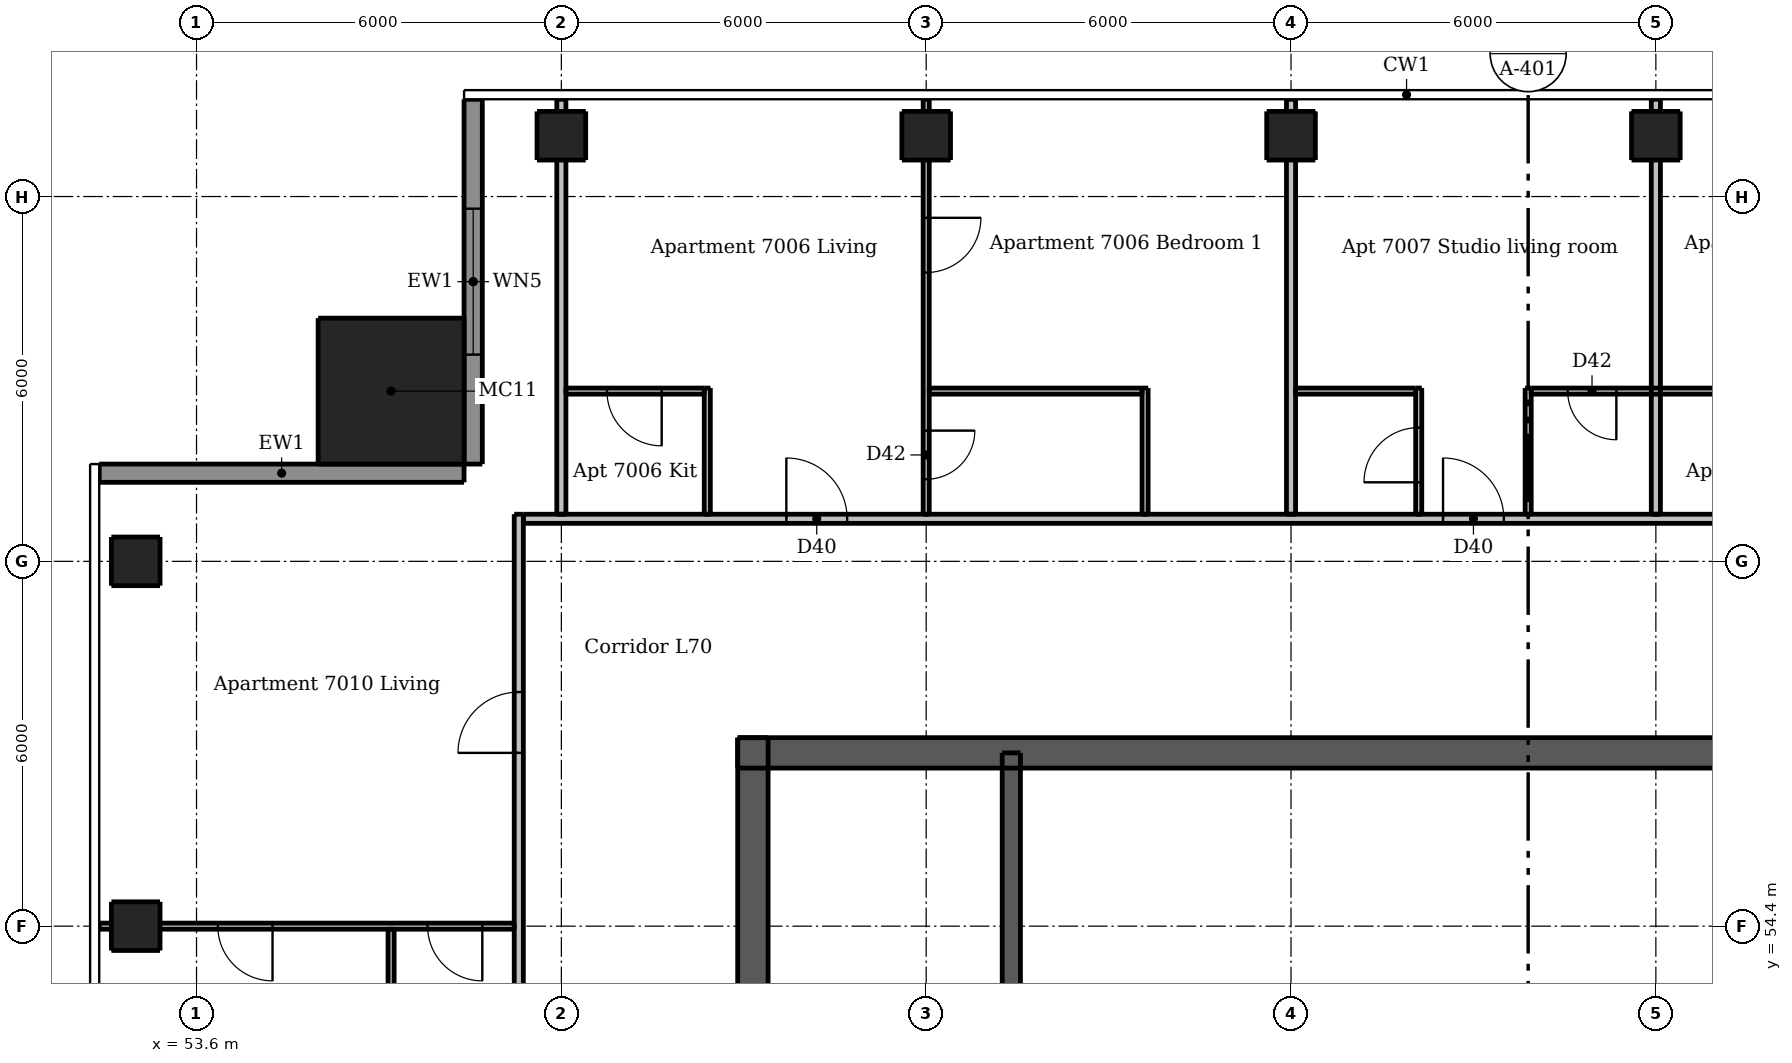
"""IFC4 building model, lengths in metres.
Left out: names, types, materials, properties, quantities, classifications, styles, units other than length and angle.
Written with IfcOpenShell. Run it as: python <this file> out.ifc"""

import sys

from ifc_helpers import new_model, si_unit, direction, frame, frame_2d, origin, origin_2d, place, context, subcontext, project, spatial, rectangle, extrude, element, fill, save


model = new_model("IFC4")
c1 = context("Model", 3, precision=1e-05, world=origin(), true_north=direction((0.0, 1.0)))
c2 = subcontext(c1, "Body", "Model", "MODEL_VIEW")
j1 = project(units=[si_unit("LENGTHUNIT", "METRE"), si_unit("PLANEANGLEUNIT", "RADIAN")], contexts=[c1])
p1 = place(None, origin())
s1 = spatial("IfcSite", under=j1, at=p1, CompositionType="ELEMENT")
p2 = place(p1, origin())
s2 = spatial("IfcBuilding", under=s1, at=p2, CompositionType="ELEMENT")
p3 = place(p2, frame((0.0, 0.0, 262.0)))
s3 = spatial("IfcBuildingStorey", under=s2, at=p3, CompositionType="ELEMENT", Elevation=262.0)
p4 = place(p3, frame((62.5, 57.25, 0.0), z_axis=(0.0, 0.0, 1.0), x_axis=(1.0, 0.0, 0.0)))
e1 = element("IfcWall", 1, at=p4, inside=s3, PredefinedType="SHEAR", context=c2, shape_type="SweptSolid", body=[
    extrude(rectangle(XDim=24.0, YDim=0.5, at=frame_2d((12.0, 0.0))), origin(), (0.0, 0.0, 1.0), 3.05),
])
p5 = place(p4, frame((21.025, 0.0, 0.0)))
e2 = element("IfcOpeningElement", 2, at=p5, cuts=e1, PredefinedType="OPENING", context=c2, shape_type="SweptSolid", body=[
    extrude(rectangle(XDim=1.1, YDim=2.1, at=frame_2d((0.55, 1.05))), frame((0.0, 0.26, 0.0), z_axis=(0.0, -1.0, 0.0), x_axis=(1.0, 0.0, 0.0)), (0.0, 0.0, 1.0), 0.52),
])
p6 = place(p4, frame((1.875, 0.0, 0.0)))
e3 = element("IfcOpeningElement", 3, at=p6, cuts=e1, PredefinedType="OPENING", context=c2, shape_type="SweptSolid", body=[
    extrude(rectangle(XDim=1.1, YDim=2.1, at=frame_2d((0.55, 1.05))), frame((0.0, 0.26, 0.0), z_axis=(0.0, -1.0, 0.0), x_axis=(1.0, 0.0, 0.0)), (0.0, 0.0, 1.0), 0.52),
])
p7 = place(p4, frame((11.55, 0.0, 0.0)))
e4 = element("IfcOpeningElement", 4, at=p7, cuts=e1, PredefinedType="OPENING", context=c2, shape_type="SweptSolid", body=[
    extrude(rectangle(XDim=0.9, YDim=2.1, at=frame_2d((0.45, 1.05))), frame((0.0, 0.26, 0.0), z_axis=(0.0, -1.0, 0.0), x_axis=(1.0, 0.0, 0.0)), (0.0, 0.0, 1.0), 0.52),
])
p8 = place(p3, frame((62.75, 33.5, 0.0), z_axis=(0.0, 0.0, 1.0), x_axis=(0.0, 1.0, 0.0)))
e5 = element("IfcWall", 5, at=p8, inside=s3, PredefinedType="SHEAR", context=c2, shape_type="SweptSolid", body=[
    extrude(rectangle(XDim=24.0, YDim=0.5, at=frame_2d((12.0, 0.0))), origin(), (0.0, 0.0, 1.0), 3.05),
])
p9 = place(p8, frame((11.2, 0.0, 0.0)))
e6 = element("IfcOpeningElement", 6, at=p9, cuts=e5, PredefinedType="OPENING", context=c2, shape_type="SweptSolid", body=[
    extrude(rectangle(XDim=1.6, YDim=2.1, at=frame_2d((0.8, 1.05))), frame((0.0, 0.26, 0.0), z_axis=(0.0, -1.0, 0.0), x_axis=(1.0, 0.0, 0.0)), (0.0, 0.0, 1.0), 0.52),
])
p10 = place(p3, frame((67.0, 47.1, 0.0), z_axis=(0.0, 0.0, 1.0), x_axis=(0.0, 1.0, 0.0)))
e7 = element("IfcWall", 7, at=p10, inside=s3, PredefinedType="SHEAR", context=c2, shape_type="SweptSolid", body=[
    extrude(rectangle(XDim=10.15, YDim=0.3, at=frame_2d((5.075, 0.0))), origin(), (0.0, 0.0, 1.0), 3.05),
])
for number, where, z_axis, x_axis in (
    (8, (59.6, 67.4, 0.0), (0.0, 0.0, 1.0), (1.0, 0.0, 0.0)),
    (9, (65.6, 67.4, 0.0), (0.0, 0.0, 1.0), (1.0, 0.0, 0.0)),
    (10, (71.6, 67.4, 0.0), (0.0, 0.0, 1.0), (1.0, 0.0, 0.0)),
    (11, (77.6, 67.4, 0.0), (0.0, 0.0, 1.0), (1.0, 0.0, 0.0)),
    (12, (52.6, 54.4, 0.0), (0.0, 0.0, 1.0), (1.0, 0.0, 0.0)),
    (13, (52.6, 60.4, 0.0), (0.0, 0.0, 1.0), (1.0, 0.0, 0.0)),
):
    element("IfcColumn", number, at=place(p3, frame(where, z_axis=z_axis, x_axis=x_axis)), inside=s3, PredefinedType="COLUMN", context=c2, shape_type="SweptSolid", body=[
        extrude(rectangle(XDim=0.8, YDim=0.8, at=origin_2d()), origin(), (0.0, 0.0, 1.0), 3.05),
    ])
p11 = place(p3, frame((56.8, 63.2, 0.0), z_axis=(0.0, 0.0, 1.0), x_axis=(1.0, 0.0, 0.0)))
e14 = element("IfcColumn", 14, at=p11, inside=s3, PredefinedType="COLUMN", context=c2, shape_type="SweptSolid", body=[
    extrude(rectangle(XDim=2.4, YDim=2.4, at=origin_2d()), origin(), (0.0, 0.0, 1.0), 3.3),
])
p12 = place(p3, frame((58.15, 68.0, 0.0), z_axis=(0.0, 0.0, 1.0), x_axis=(0.0, -1.0, 0.0)))
e15 = element("IfcWall", 15, at=p12, inside=s3, PredefinedType="SOLIDWALL", context=c2, shape_type="SweptSolid", body=[
    extrude(rectangle(XDim=6.0, YDim=0.3, at=frame_2d((3.0, 0.0))), origin(), (0.0, 0.0, 1.0), 3.05),
])
p13 = place(p12, frame((1.8, 0.0, 0.15)))
e16 = element("IfcOpeningElement", 16, at=p13, cuts=e15, PredefinedType="OPENING", context=c2, shape_type="SweptSolid", body=[
    extrude(rectangle(XDim=2.4, YDim=2.1, at=frame_2d((1.2, 1.05))), frame((0.0, 0.16, 0.0), z_axis=(0.0, -1.0, 0.0), x_axis=(1.0, 0.0, 0.0)), (0.0, 0.0, 1.0), 0.32),
])
p14 = place(p3, frame((58.0, 61.85, 0.0), z_axis=(0.0, 0.0, 1.0), x_axis=(-1.0, 0.0, 0.0)))
e17 = element("IfcWall", 17, at=p14, inside=s3, PredefinedType="SOLIDWALL", context=c2, shape_type="SweptSolid", body=[
    extrude(rectangle(XDim=6.0, YDim=0.3, at=frame_2d((3.0, 0.0))), origin(), (0.0, 0.0, 1.0), 3.05),
])
p15 = place(p3, frame((56.8, 54.35, 0.0), z_axis=(0.0, 0.0, 1.0), x_axis=(0.0, -1.0, 0.0)))
e18 = element("IfcWall", 18, at=p15, inside=s3, PredefinedType="PARTITIONING", context=c2, shape_type="SweptSolid", body=[
    extrude(rectangle(XDim=5.875, YDim=0.1, at=frame_2d((2.938, 0.0))), origin(), (0.0, 0.0, 1.0), 3.05),
])
p16 = place(p15, frame((3.75, 0.0, 0.0)))
e19 = element("IfcOpeningElement", 19, at=p16, cuts=e18, PredefinedType="OPENING", context=c2, shape_type="SweptSolid", body=[
    extrude(rectangle(XDim=0.8, YDim=2.1, at=frame_2d((0.4, 1.05))), frame((0.0, 0.06, 0.0), z_axis=(0.0, -1.0, 0.0), x_axis=(1.0, 0.0, 0.0)), (0.0, 0.0, 1.0), 0.12),
])
p17 = place(p3, frame((62.0, 61.175, 0.0), z_axis=(0.0, 0.0, 1.0), x_axis=(0.0, 1.0, 0.0)))
e20 = element("IfcWall", 20, at=p17, inside=s3, PredefinedType="PARTITIONING", context=c2, shape_type="SweptSolid", body=[
    extrude(rectangle(XDim=2.075, YDim=0.1, at=frame_2d((1.038, 0.0))), origin(), (0.0, 0.0, 1.0), 3.05),
])
p18 = place(p3, frame((65.6, 68.0, 0.0), z_axis=(0.0, 0.0, 1.0), x_axis=(0.0, -1.0, 0.0)))
e21 = element("IfcWall", 21, at=p18, inside=s3, PredefinedType="PARTITIONING", context=c2, shape_type="SweptSolid", body=[
    extrude(rectangle(XDim=6.825, YDim=0.1, at=frame_2d((3.413, 0.0))), origin(), (0.0, 0.0, 1.0), 2.516),
])
p19 = place(p18, frame((1.95, 0.0, 0.0)))
e22 = element("IfcOpeningElement", 22, at=p19, cuts=e21, PredefinedType="OPENING", context=c2, shape_type="SweptSolid", body=[
    extrude(rectangle(XDim=0.9, YDim=2.1, at=frame_2d((0.45, 1.05))), frame((0.0, 0.06, 0.0), z_axis=(0.0, -1.0, 0.0), x_axis=(1.0, 0.0, 0.0)), (0.0, 0.0, 1.0), 0.12),
])
p20 = place(p18, frame((5.45, 0.0, 0.0)))
e23 = element("IfcOpeningElement", 23, at=p20, cuts=e21, PredefinedType="OPENING", context=c2, shape_type="SweptSolid", body=[
    extrude(rectangle(XDim=0.8, YDim=2.1, at=frame_2d((0.4, 1.05))), frame((0.0, 0.06, 0.0), z_axis=(0.0, -1.0, 0.0), x_axis=(1.0, 0.0, 0.0)), (0.0, 0.0, 1.0), 0.12),
])
p21 = place(p3, frame((69.2, 61.175, 0.0), z_axis=(0.0, 0.0, 1.0), x_axis=(0.0, 1.0, 0.0)))
e24 = element("IfcWall", 24, at=p21, inside=s3, PredefinedType="PARTITIONING", context=c2, shape_type="SweptSolid", body=[
    extrude(rectangle(XDim=2.075, YDim=0.1, at=frame_2d((1.038, 0.0))), origin(), (0.0, 0.0, 1.0), 3.05),
])
p22 = place(p3, frame((73.7, 61.175, 0.0), z_axis=(0.0, 0.0, 1.0), x_axis=(0.0, 1.0, 0.0)))
e25 = element("IfcWall", 25, at=p22, inside=s3, PredefinedType="PARTITIONING", context=c2, shape_type="SweptSolid", body=[
    extrude(rectangle(XDim=2.075, YDim=0.1, at=frame_2d((1.038, 0.0))), origin(), (0.0, 0.0, 1.0), 3.05),
])
p23 = place(p22, frame((0.525, 0.0, 0.0)))
e26 = element("IfcOpeningElement", 26, at=p23, cuts=e25, PredefinedType="OPENING", context=c2, shape_type="SweptSolid", body=[
    extrude(rectangle(XDim=0.9, YDim=2.1, at=frame_2d((0.45, 1.05))), frame((0.0, 0.06, 0.0), z_axis=(0.0, -1.0, 0.0), x_axis=(1.0, 0.0, 0.0)), (0.0, 0.0, 1.0), 0.12),
])
p24 = place(p3, frame((75.5, 61.175, 0.0), z_axis=(0.0, 0.0, 1.0), x_axis=(0.0, 1.0, 0.0)))
e27 = element("IfcWall", 27, at=p24, inside=s3, PredefinedType="PARTITIONING", context=c2, shape_type="SweptSolid", body=[
    extrude(rectangle(XDim=2.075, YDim=0.1, at=frame_2d((1.038, 0.0))), origin(), (0.0, 0.0, 1.0), 3.05),
])
p25 = place(p3, frame((61.95, 63.2, 0.0), z_axis=(0.0, 0.0, 1.0), x_axis=(-1.0, 0.0, 0.0)))
e28 = element("IfcWall", 28, at=p25, inside=s3, PredefinedType="PARTITIONING", context=c2, shape_type="SweptSolid", body=[
    extrude(rectangle(XDim=2.275, YDim=0.1, at=frame_2d((1.137, 0.0))), origin(), (0.0, 0.0, 1.0), 3.05),
])
p26 = place(p25, frame((0.7, 0.0, 0.0)))
e29 = element("IfcOpeningElement", 29, at=p26, cuts=e28, PredefinedType="OPENING", context=c2, shape_type="SweptSolid", body=[
    extrude(rectangle(XDim=0.9, YDim=2.1, at=frame_2d((0.45, 1.05))), frame((0.0, 0.06, 0.0), z_axis=(0.0, -1.0, 0.0), x_axis=(1.0, 0.0, 0.0)), (0.0, 0.0, 1.0), 0.12),
])
p27 = place(p3, frame((65.65, 63.2, 0.0), z_axis=(0.0, 0.0, 1.0), x_axis=(1.0, 0.0, 0.0)))
e30 = element("IfcWall", 30, at=p27, inside=s3, PredefinedType="PARTITIONING", context=c2, shape_type="SweptSolid", body=[
    extrude(rectangle(XDim=3.5, YDim=0.1, at=frame_2d((1.75, 0.0))), origin(), (0.0, 0.0, 1.0), 3.05),
])
p28 = place(p3, frame((71.675, 63.2, 0.0), z_axis=(0.0, 0.0, 1.0), x_axis=(1.0, 0.0, 0.0)))
e31 = element("IfcWall", 31, at=p28, inside=s3, PredefinedType="PARTITIONING", context=c2, shape_type="SweptSolid", body=[
    extrude(rectangle(XDim=1.975, YDim=0.1, at=frame_2d((0.987, 0.0))), origin(), (0.0, 0.0, 1.0), 3.05),
])
p29 = place(p3, frame((83.55, 63.2, 0.0), z_axis=(0.0, 0.0, 1.0), x_axis=(-1.0, 0.0, 0.0)))
e32 = element("IfcWall", 32, at=p29, inside=s3, PredefinedType="PARTITIONING", context=c2, shape_type="SweptSolid", body=[
    extrude(rectangle(XDim=8.0, YDim=0.1, at=frame_2d((4.0, 0.0))), origin(), (0.0, 0.0, 1.0), 3.05),
])
p30 = place(p29, frame((6.6, 0.0, 0.0)))
e33 = element("IfcOpeningElement", 33, at=p30, cuts=e32, PredefinedType="OPENING", context=c2, shape_type="SweptSolid", body=[
    extrude(rectangle(XDim=0.8, YDim=2.1, at=frame_2d((0.4, 1.05))), frame((0.0, 0.06, 0.0), z_axis=(0.0, -1.0, 0.0), x_axis=(1.0, 0.0, 0.0)), (0.0, 0.0, 1.0), 0.12),
])
p31 = place(p29, frame((3.75, 0.0, 0.0)))
e34 = element("IfcOpeningElement", 34, at=p31, cuts=e32, PredefinedType="OPENING", context=c2, shape_type="SweptSolid", body=[
    extrude(rectangle(XDim=0.8, YDim=2.1, at=frame_2d((0.4, 1.05))), frame((0.0, 0.06, 0.0), z_axis=(0.0, -1.0, 0.0), x_axis=(1.0, 0.0, 0.0)), (0.0, 0.0, 1.0), 0.12),
])
p32 = place(p3, frame((58.825, 54.4, 0.0), z_axis=(0.0, 0.0, 1.0), x_axis=(-1.0, 0.0, 0.0)))
e35 = element("IfcWall", 35, at=p32, inside=s3, PredefinedType="PARTITIONING", context=c2, shape_type="SweptSolid", body=[
    extrude(rectangle(XDim=6.825, YDim=0.1, at=frame_2d((3.413, 0.0))), origin(), (0.0, 0.0, 1.0), 2.516),
])
p33 = place(p32, frame((0.525, 0.0, 0.0)))
e36 = element("IfcOpeningElement", 36, at=p33, cuts=e35, PredefinedType="OPENING", context=c2, shape_type="SweptSolid", body=[
    extrude(rectangle(XDim=0.9, YDim=2.1, at=frame_2d((0.45, 1.05))), frame((0.0, 0.06, 0.0), z_axis=(0.0, -1.0, 0.0), x_axis=(1.0, 0.0, 0.0)), (0.0, 0.0, 1.0), 0.12),
])
p34 = place(p32, frame((3.975, 0.0, 0.0)))
e37 = element("IfcOpeningElement", 37, at=p34, cuts=e35, PredefinedType="OPENING", context=c2, shape_type="SweptSolid", body=[
    extrude(rectangle(XDim=0.9, YDim=2.1, at=frame_2d((0.45, 1.05))), frame((0.0, 0.06, 0.0), z_axis=(0.0, -1.0, 0.0), x_axis=(1.0, 0.0, 0.0)), (0.0, 0.0, 1.0), 0.12),
])
p35 = place(p3, frame((58.9, 30.325, 0.0), z_axis=(0.0, 0.0, 1.0), x_axis=(0.0, 1.0, 0.0)))
e38 = element("IfcWall", 38, at=p35, inside=s3, PredefinedType="PARTITIONING", context=c2, shape_type="SweptSolid", body=[
    extrude(rectangle(XDim=30.85, YDim=0.15, at=frame_2d((15.425, 0.0))), origin(), (0.0, 0.0, 1.0), 3.05),
])
p36 = place(p35, frame((9.225, 0.0, 0.0)))
e39 = element("IfcOpeningElement", 39, at=p36, cuts=e38, PredefinedType="OPENING", context=c2, shape_type="SweptSolid", body=[
    extrude(rectangle(XDim=1.0, YDim=2.1, at=frame_2d((0.5, 1.05))), frame((0.0, 0.085, 0.0), z_axis=(0.0, -1.0, 0.0), x_axis=(1.0, 0.0, 0.0)), (0.0, 0.0, 1.0), 0.17),
])
p37 = place(p35, frame((26.925, 0.0, 0.0)))
e40 = element("IfcOpeningElement", 40, at=p37, cuts=e38, PredefinedType="OPENING", context=c2, shape_type="SweptSolid", body=[
    extrude(rectangle(XDim=1.0, YDim=2.1, at=frame_2d((0.5, 1.05))), frame((0.0, 0.085, 0.0), z_axis=(0.0, -1.0, 0.0), x_axis=(1.0, 0.0, 0.0)), (0.0, 0.0, 1.0), 0.17),
])
p38 = place(p3, frame((59.6, 61.175, 0.0), z_axis=(0.0, 0.0, 1.0), x_axis=(0.0, 1.0, 0.0)))
e41 = element("IfcWall", 41, at=p38, inside=s3, PredefinedType="PARTITIONING", context=c2, shape_type="SweptSolid", body=[
    extrude(rectangle(XDim=6.825, YDim=0.15, at=frame_2d((3.413, 0.0))), origin(), (0.0, 0.0, 1.0), 2.51),
])
for number, where, z_axis, x_axis in (
    (42, (71.6, 61.175, 0.0), (0.0, 0.0, 1.0), (0.0, 1.0, 0.0)),
    (43, (77.6, 61.175, 0.0), (0.0, 0.0, 1.0), (0.0, 1.0, 0.0)),
):
    element("IfcWall", number, at=place(p3, frame(where, z_axis=z_axis, x_axis=x_axis)), inside=s3, PredefinedType="PARTITIONING", context=c2, shape_type="SweptSolid", body=[
        extrude(rectangle(XDim=6.825, YDim=0.15, at=frame_2d((3.413, 0.0))), origin(), (0.0, 0.0, 1.0), 2.516),
    ])
p39 = place(p3, frame((58.975, 61.1, 0.0), z_axis=(0.0, 0.0, 1.0), x_axis=(1.0, 0.0, 0.0)))
e44 = element("IfcWall", 44, at=p39, inside=s3, PredefinedType="PARTITIONING", context=c2, shape_type="SweptSolid", body=[
    extrude(rectangle(XDim=29.25, YDim=0.15, at=frame_2d((14.625, 0.0))), origin(), (0.0, 0.0, 1.0), 3.05),
])
p40 = place(p39, frame((4.325, 0.0, 0.0)))
e45 = element("IfcOpeningElement", 45, at=p40, cuts=e44, PredefinedType="OPENING", context=c2, shape_type="SweptSolid", body=[
    extrude(rectangle(XDim=1.0, YDim=2.1, at=frame_2d((0.5, 1.05))), frame((0.0, 0.085, 0.0), z_axis=(0.0, -1.0, 0.0), x_axis=(1.0, 0.0, 0.0)), (0.0, 0.0, 1.0), 0.17),
])
p41 = place(p39, frame((15.125, 0.0, 0.0)))
e46 = element("IfcOpeningElement", 46, at=p41, cuts=e44, PredefinedType="OPENING", context=c2, shape_type="SweptSolid", body=[
    extrude(rectangle(XDim=1.0, YDim=2.1, at=frame_2d((0.5, 1.05))), frame((0.0, 0.085, 0.0), z_axis=(0.0, -1.0, 0.0), x_axis=(1.0, 0.0, 0.0)), (0.0, 0.0, 1.0), 0.17),
])
p42 = place(p39, frame((26.475, 0.0, 0.0)))
e47 = element("IfcOpeningElement", 47, at=p42, cuts=e44, PredefinedType="OPENING", context=c2, shape_type="SweptSolid", body=[
    extrude(rectangle(XDim=1.0, YDim=2.1, at=frame_2d((0.5, 1.05))), frame((0.0, 0.085, 0.0), z_axis=(0.0, -1.0, 0.0), x_axis=(1.0, 0.0, 0.0)), (0.0, 0.0, 1.0), 0.17),
])
p43 = place(p13, origin())
e48 = element("IfcWindow", 48, at=p43, inside=s3, PartitioningType="DOUBLE_PANEL_VERTICAL", PredefinedType="WINDOW", context=c2, shape_type="SweptSolid", body=[
    extrude(rectangle(XDim=2.4, YDim=2.1, at=frame_2d((1.2, 1.05))), frame((0.0, 0.03, 0.0), z_axis=(0.0, -1.0, 0.0), x_axis=(1.0, 0.0, 0.0)), (0.0, 0.0, 1.0), 0.06),
])
fill(e16, e48)
p44 = place(p6, origin())
e49 = element("IfcDoor", 49, at=p44, inside=s3, OperationType="SINGLE_SWING_LEFT", PredefinedType="DOOR", context=c2, shape_type="SweptSolid", body=[
    extrude(rectangle(XDim=1.1, YDim=2.1, at=frame_2d((0.55, 1.05))), frame((0.0, -0.188, 0.0), z_axis=(0.0, -1.0, 0.0), x_axis=(1.0, 0.0, 0.0)), (0.0, 0.0, 1.0), 0.05),
])
fill(e3, e49)
p45 = place(p7, origin())
e50 = element("IfcDoor", 50, at=p45, inside=s3, OperationType="SINGLE_SWING_RIGHT", PredefinedType="DOOR", context=c2, shape_type="SweptSolid", body=[
    extrude(rectangle(XDim=0.9, YDim=2.1, at=frame_2d((0.45, 1.05))), frame((0.0, -0.188, 0.0), z_axis=(0.0, -1.0, 0.0), x_axis=(1.0, 0.0, 0.0)), (0.0, 0.0, 1.0), 0.05),
])
fill(e4, e50)
p46 = place(p40, origin())
e51 = element("IfcDoor", 51, at=p46, inside=s3, OperationType="SINGLE_SWING_LEFT", PredefinedType="DOOR", context=c2, shape_type="SweptSolid", body=[
    extrude(rectangle(XDim=1.0, YDim=2.1, at=frame_2d((0.5, 1.05))), frame((0.0, 0.025, 0.0), z_axis=(0.0, -1.0, 0.0), x_axis=(1.0, 0.0, 0.0)), (0.0, 0.0, 1.0), 0.05),
])
fill(e45, e51)
p47 = place(p26, origin())
e52 = element("IfcDoor", 52, at=p47, inside=s3, OperationType="SINGLE_SWING_LEFT", PredefinedType="DOOR", context=c2, shape_type="SweptSolid", body=[
    extrude(rectangle(XDim=0.9, YDim=2.1, at=frame_2d((0.45, 1.05))), frame((0.0, 0.025, 0.0), z_axis=(0.0, -1.0, 0.0), x_axis=(1.0, 0.0, 0.0)), (0.0, 0.0, 1.0), 0.05),
])
fill(e29, e52)
p48 = place(p19, origin())
e53 = element("IfcDoor", 53, at=p48, inside=s3, OperationType="SINGLE_SWING_LEFT", PredefinedType="DOOR", context=c2, shape_type="SweptSolid", body=[
    extrude(rectangle(XDim=0.9, YDim=2.1, at=frame_2d((0.45, 1.05))), frame((0.0, 0.025, 0.0), z_axis=(0.0, -1.0, 0.0), x_axis=(1.0, 0.0, 0.0)), (0.0, 0.0, 1.0), 0.05),
])
fill(e22, e53)
p49 = place(p20, origin())
e54 = element("IfcDoor", 54, at=p49, inside=s3, OperationType="SINGLE_SWING_LEFT", PredefinedType="DOOR", context=c2, shape_type="SweptSolid", body=[
    extrude(rectangle(XDim=0.8, YDim=2.1, at=frame_2d((0.4, 1.05))), frame((0.0, 0.025, 0.0), z_axis=(0.0, -1.0, 0.0), x_axis=(1.0, 0.0, 0.0)), (0.0, 0.0, 1.0), 0.05),
])
fill(e23, e54)
p50 = place(p41, origin())
e55 = element("IfcDoor", 55, at=p50, inside=s3, OperationType="SINGLE_SWING_LEFT", PredefinedType="DOOR", context=c2, shape_type="SweptSolid", body=[
    extrude(rectangle(XDim=1.0, YDim=2.1, at=frame_2d((0.5, 1.05))), frame((0.0, 0.025, 0.0), z_axis=(0.0, -1.0, 0.0), x_axis=(1.0, 0.0, 0.0)), (0.0, 0.0, 1.0), 0.05),
])
fill(e46, e55)
p51 = place(p23, origin())
e56 = element("IfcDoor", 56, at=p51, inside=s3, OperationType="SINGLE_SWING_LEFT", PredefinedType="DOOR", context=c2, shape_type="SweptSolid", body=[
    extrude(rectangle(XDim=0.9, YDim=2.1, at=frame_2d((0.45, 1.05))), frame((0.0, 0.025, 0.0), z_axis=(0.0, -1.0, 0.0), x_axis=(1.0, 0.0, 0.0)), (0.0, 0.0, 1.0), 0.05),
])
fill(e26, e56)
p52 = place(p30, origin())
e57 = element("IfcDoor", 57, at=p52, inside=s3, OperationType="SINGLE_SWING_LEFT", PredefinedType="DOOR", context=c2, shape_type="SweptSolid", body=[
    extrude(rectangle(XDim=0.8, YDim=2.1, at=frame_2d((0.4, 1.05))), frame((0.0, 0.025, 0.0), z_axis=(0.0, -1.0, 0.0), x_axis=(1.0, 0.0, 0.0)), (0.0, 0.0, 1.0), 0.05),
])
fill(e33, e57)
p53 = place(p37, origin())
e58 = element("IfcDoor", 58, at=p53, inside=s3, OperationType="SINGLE_SWING_LEFT", PredefinedType="DOOR", context=c2, shape_type="SweptSolid", body=[
    extrude(rectangle(XDim=1.0, YDim=2.1, at=frame_2d((0.5, 1.05))), frame((0.0, 0.025, 0.0), z_axis=(0.0, -1.0, 0.0), x_axis=(1.0, 0.0, 0.0)), (0.0, 0.0, 1.0), 0.05),
])
fill(e40, e58)
p54 = place(p33, origin())
e59 = element("IfcDoor", 59, at=p54, inside=s3, OperationType="SINGLE_SWING_LEFT", PredefinedType="DOOR", context=c2, shape_type="SweptSolid", body=[
    extrude(rectangle(XDim=0.9, YDim=2.1, at=frame_2d((0.45, 1.05))), frame((0.0, 0.025, 0.0), z_axis=(0.0, -1.0, 0.0), x_axis=(1.0, 0.0, 0.0)), (0.0, 0.0, 1.0), 0.05),
])
fill(e36, e59)
p55 = place(p34, origin())
e60 = element("IfcDoor", 60, at=p55, inside=s3, OperationType="SINGLE_SWING_LEFT", PredefinedType="DOOR", context=c2, shape_type="SweptSolid", body=[
    extrude(rectangle(XDim=0.9, YDim=2.1, at=frame_2d((0.45, 1.05))), frame((0.0, 0.025, 0.0), z_axis=(0.0, -1.0, 0.0), x_axis=(1.0, 0.0, 0.0)), (0.0, 0.0, 1.0), 0.05),
])
fill(e37, e60)
save(model, sys.argv[1])
